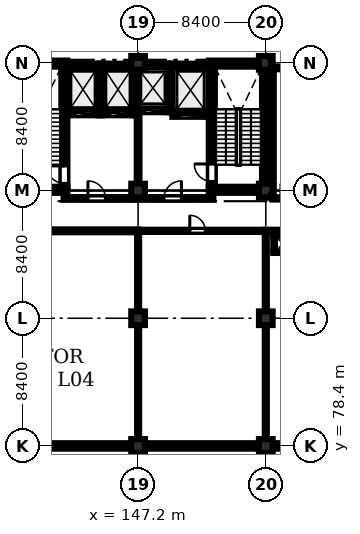
"""IFC4 building model, lengths in metres.
Left out: names, types, materials, properties, quantities, classifications, styles, units other than length and angle.
Written with IfcOpenShell. Run it as: python <this file> out.ifc"""

import sys

from ifc_helpers import new_model, si_unit, direction, frame, frame_2d, origin, origin_2d, place, context, subcontext, project, spatial, rectangle, extrude, element, fill, save


model = new_model("IFC4")
c1 = context("Model", 3, precision=1e-05, world=origin(), true_north=direction((0.0, 1.0)))
c2 = subcontext(c1, "Body", "Model", "MODEL_VIEW")
j1 = project(units=[si_unit("LENGTHUNIT", "METRE"), si_unit("PLANEANGLEUNIT", "RADIAN")], contexts=[c1])
p1 = place(None, origin())
s1 = spatial("IfcSite", under=j1, at=p1, CompositionType="ELEMENT")
p2 = place(p1, origin())
s2 = spatial("IfcBuilding", under=s1, at=p2, CompositionType="ELEMENT")
p3 = place(p2, frame((0.0, 0.0, 14.7)))
s3 = spatial("IfcBuildingStorey", under=s2, at=p3, CompositionType="ELEMENT", Elevation=14.7)
for number, where, z_axis, x_axis in (
    (1, (147.2, 78.4, 0.0), (0.0, 0.0, 1.0), (1.0, 0.0, 0.0)),
    (2, (147.2, 86.8, 0.0), (0.0, 0.0, 1.0), (1.0, 0.0, 0.0)),
    (3, (147.2, 95.2, 0.0), (0.0, 0.0, 1.0), (1.0, 0.0, 0.0)),
    (4, (147.2, 103.6, 0.0), (0.0, 0.0, 1.0), (1.0, 0.0, 0.0)),
    (5, (155.6, 78.4, 0.0), (0.0, 0.0, 1.0), (1.0, 0.0, 0.0)),
    (6, (155.6, 86.8, 0.0), (0.0, 0.0, 1.0), (1.0, 0.0, 0.0)),
    (7, (155.6, 95.2, 0.0), (0.0, 0.0, 1.0), (1.0, 0.0, 0.0)),
    (8, (155.6, 103.6, 0.0), (0.0, 0.0, 1.0), (1.0, 0.0, 0.0)),
):
    element("IfcColumn", number, at=place(p3, frame(where, z_axis=z_axis, x_axis=x_axis)), inside=s3, PredefinedType="COLUMN", context=c2, shape_type="SweptSolid", body=[
        extrude(rectangle(XDim=0.9, YDim=0.9, at=origin_2d()), origin(), (0.0, 0.0, 1.0), 4.26),
    ])
for number, where, z_axis, x_axis in (
    (9, (138.65, 95.25, 0.0), (0.0, 0.0, 1.0), (1.0, 0.0, 0.0)),
    (10, (138.65, 103.55, 0.0), (0.0, 0.0, 1.0), (1.0, 0.0, 0.0)),
):
    element("IfcWall", number, at=place(p3, frame(where, z_axis=z_axis, x_axis=x_axis)), inside=s3, PredefinedType="SHEAR", context=c2, shape_type="SweptSolid", body=[
        extrude(rectangle(XDim=3.9, YDim=0.4, at=frame_2d((1.95, 0.0))), origin(), (0.0, 0.0, 1.0), 4.26),
    ])
p4 = place(p3, frame((142.35, 95.45, 0.0), z_axis=(0.0, 0.0, 1.0), x_axis=(0.0, 1.0, 0.0)))
e11 = element("IfcWall", 11, at=p4, inside=s3, PredefinedType="SHEAR", context=c2, shape_type="SweptSolid", body=[
    extrude(rectangle(XDim=7.9, YDim=0.4, at=frame_2d((3.95, 0.0))), origin(), (0.0, 0.0, 1.0), 4.26),
])
p5 = place(p4, frame((0.22, 0.0, 0.0)))
e12 = element("IfcOpeningElement", 12, at=p5, cuts=e11, PredefinedType="OPENING", context=c2, shape_type="SweptSolid", body=[
    extrude(rectangle(XDim=1.15, YDim=2.15, at=frame_2d((0.575, 1.075))), frame((0.0, 0.21, 0.0), z_axis=(0.0, -1.0, 0.0), x_axis=(1.0, 0.0, 0.0)), (0.0, 0.0, 1.0), 0.42),
])
for number, where, z_axis, x_axis in (
    (13, (151.85, 95.25, 0.0), (0.0, 0.0, 1.0), (1.0, 0.0, 0.0)),
    (14, (151.85, 103.55, 0.0), (0.0, 0.0, 1.0), (1.0, 0.0, 0.0)),
):
    element("IfcWall", number, at=place(p3, frame(where, z_axis=z_axis, x_axis=x_axis)), inside=s3, PredefinedType="SHEAR", context=c2, shape_type="SweptSolid", body=[
        extrude(rectangle(XDim=3.9, YDim=0.4, at=frame_2d((1.95, 0.0))), origin(), (0.0, 0.0, 1.0), 4.26),
    ])
p6 = place(p3, frame((152.05, 95.45, 0.0), z_axis=(0.0, 0.0, 1.0), x_axis=(0.0, 1.0, 0.0)))
e15 = element("IfcWall", 15, at=p6, inside=s3, PredefinedType="SHEAR", context=c2, shape_type="SweptSolid", body=[
    extrude(rectangle(XDim=7.9, YDim=0.4, at=frame_2d((3.95, 0.0))), origin(), (0.0, 0.0, 1.0), 4.26),
])
p7 = place(p6, frame((0.35, 0.0, 0.0)))
e16 = element("IfcOpeningElement", 16, at=p7, cuts=e15, PredefinedType="OPENING", context=c2, shape_type="SweptSolid", body=[
    extrude(rectangle(XDim=1.15, YDim=2.15, at=frame_2d((0.575, 1.075))), frame((0.0, 0.21, 0.0), z_axis=(0.0, -1.0, 0.0), x_axis=(1.0, 0.0, 0.0)), (0.0, 0.0, 1.0), 0.42),
])
p8 = place(p3, frame((155.55, 95.45, 0.0), z_axis=(0.0, 0.0, 1.0), x_axis=(0.0, 1.0, 0.0)))
e17 = element("IfcWall", 17, at=p8, inside=s3, PredefinedType="SHEAR", context=c2, shape_type="SweptSolid", body=[
    extrude(rectangle(XDim=7.9, YDim=0.4, at=frame_2d((3.95, 0.0))), origin(), (0.0, 0.0, 1.0), 4.26),
])
p9 = place(p3, frame((142.55, 100.275, 0.0), z_axis=(0.0, 0.0, 1.0), x_axis=(1.0, 0.0, 0.0)))
e18 = element("IfcWall", 18, at=p9, inside=s3, PredefinedType="SHEAR", context=c2, shape_type="SweptSolid", body=[
    extrude(rectangle(XDim=2.05, YDim=0.25, at=frame_2d((1.025, 0.0))), origin(), (0.0, 0.0, 1.0), 4.26),
])
p10 = place(p9, frame((0.475, 0.0, 0.0)))
e19 = element("IfcOpeningElement", 19, at=p10, cuts=e18, PredefinedType="OPENING", context=c2, shape_type="SweptSolid", body=[
    extrude(rectangle(XDim=1.1, YDim=2.15, at=frame_2d((0.55, 1.075))), frame((0.0, 0.135, 0.0), z_axis=(0.0, -1.0, 0.0), x_axis=(1.0, 0.0, 0.0)), (0.0, 0.0, 1.0), 0.27),
])
p11 = place(p3, frame((142.55, 103.425, 0.0), z_axis=(0.0, 0.0, 1.0), x_axis=(1.0, 0.0, 0.0)))
e20 = element("IfcWall", 20, at=p11, inside=s3, PredefinedType="SHEAR", context=c2, shape_type="SweptSolid", body=[
    extrude(rectangle(XDim=2.05, YDim=0.25, at=frame_2d((1.025, 0.0))), origin(), (0.0, 0.0, 1.0), 4.26),
])
p12 = place(p3, frame((144.725, 100.15, 0.0), z_axis=(0.0, 0.0, 1.0), x_axis=(0.0, 1.0, 0.0)))
e21 = element("IfcWall", 21, at=p12, inside=s3, PredefinedType="SHEAR", context=c2, shape_type="SweptSolid", body=[
    extrude(rectangle(XDim=3.4, YDim=0.25, at=frame_2d((1.7, 0.0))), origin(), (0.0, 0.0, 1.0), 4.26),
])
p13 = place(p3, frame((144.85, 100.275, 0.0), z_axis=(0.0, 0.0, 1.0), x_axis=(1.0, 0.0, 0.0)))
e22 = element("IfcWall", 22, at=p13, inside=s3, PredefinedType="SHEAR", context=c2, shape_type="SweptSolid", body=[
    extrude(rectangle(XDim=2.05, YDim=0.25, at=frame_2d((1.025, 0.0))), origin(), (0.0, 0.0, 1.0), 4.26),
])
p14 = place(p13, frame((0.465, 0.0, 0.0)))
e23 = element("IfcOpeningElement", 23, at=p14, cuts=e22, PredefinedType="OPENING", context=c2, shape_type="SweptSolid", body=[
    extrude(rectangle(XDim=1.12, YDim=2.15, at=frame_2d((0.56, 1.075))), frame((0.0, 0.135, 0.0), z_axis=(0.0, -1.0, 0.0), x_axis=(1.0, 0.0, 0.0)), (0.0, 0.0, 1.0), 0.27),
])
p15 = place(p3, frame((144.85, 103.425, 0.0), z_axis=(0.0, 0.0, 1.0), x_axis=(1.0, 0.0, 0.0)))
e24 = element("IfcWall", 24, at=p15, inside=s3, PredefinedType="SHEAR", context=c2, shape_type="SweptSolid", body=[
    extrude(rectangle(XDim=2.05, YDim=0.25, at=frame_2d((1.025, 0.0))), origin(), (0.0, 0.0, 1.0), 4.26),
])
p16 = place(p3, frame((147.025, 100.15, 0.0), z_axis=(0.0, 0.0, 1.0), x_axis=(0.0, 1.0, 0.0)))
e25 = element("IfcWall", 25, at=p16, inside=s3, PredefinedType="SHEAR", context=c2, shape_type="SweptSolid", body=[
    extrude(rectangle(XDim=3.4, YDim=0.25, at=frame_2d((1.7, 0.0))), origin(), (0.0, 0.0, 1.0), 4.26),
])
p17 = place(p3, frame((147.15, 100.475, 0.0), z_axis=(0.0, 0.0, 1.0), x_axis=(1.0, 0.0, 0.0)))
e26 = element("IfcWall", 26, at=p17, inside=s3, PredefinedType="SHEAR", context=c2, shape_type="SweptSolid", body=[
    extrude(rectangle(XDim=2.05, YDim=0.25, at=frame_2d((1.025, 0.0))), origin(), (0.0, 0.0, 1.0), 4.26),
])
p18 = place(p17, frame((0.495, 0.0, 0.0)))
e27 = element("IfcOpeningElement", 27, at=p18, cuts=e26, PredefinedType="OPENING", context=c2, shape_type="SweptSolid", body=[
    extrude(rectangle(XDim=1.06, YDim=2.15, at=frame_2d((0.53, 1.075))), frame((0.0, 0.135, 0.0), z_axis=(0.0, -1.0, 0.0), x_axis=(1.0, 0.0, 0.0)), (0.0, 0.0, 1.0), 0.27),
])
p19 = place(p3, frame((147.15, 103.425, 0.0), z_axis=(0.0, 0.0, 1.0), x_axis=(1.0, 0.0, 0.0)))
e28 = element("IfcWall", 28, at=p19, inside=s3, PredefinedType="SHEAR", context=c2, shape_type="SweptSolid", body=[
    extrude(rectangle(XDim=2.05, YDim=0.25, at=frame_2d((1.025, 0.0))), origin(), (0.0, 0.0, 1.0), 4.26),
])
p20 = place(p3, frame((149.325, 100.35, 0.0), z_axis=(0.0, 0.0, 1.0), x_axis=(0.0, 1.0, 0.0)))
e29 = element("IfcWall", 29, at=p20, inside=s3, PredefinedType="SHEAR", context=c2, shape_type="SweptSolid", body=[
    extrude(rectangle(XDim=3.2, YDim=0.25, at=frame_2d((1.6, 0.0))), origin(), (0.0, 0.0, 1.0), 4.26),
])
p21 = place(p3, frame((149.45, 100.175, 0.0), z_axis=(0.0, 0.0, 1.0), x_axis=(1.0, 0.0, 0.0)))
e30 = element("IfcWall", 30, at=p21, inside=s3, PredefinedType="SHEAR", context=c2, shape_type="SweptSolid", body=[
    extrude(rectangle(XDim=2.4, YDim=0.25, at=frame_2d((1.2, 0.0))), origin(), (0.0, 0.0, 1.0), 4.26),
])
p22 = place(p21, frame((0.55, 0.0, 0.0)))
e31 = element("IfcOpeningElement", 31, at=p22, cuts=e30, PredefinedType="OPENING", context=c2, shape_type="SweptSolid", body=[
    extrude(rectangle(XDim=1.3, YDim=2.25, at=frame_2d((0.65, 1.125))), frame((0.0, 0.135, 0.0), z_axis=(0.0, -1.0, 0.0), x_axis=(1.0, 0.0, 0.0)), (0.0, 0.0, 1.0), 0.27),
])
p23 = place(p3, frame((149.45, 103.425, 0.0), z_axis=(0.0, 0.0, 1.0), x_axis=(1.0, 0.0, 0.0)))
e32 = element("IfcWall", 32, at=p23, inside=s3, PredefinedType="SHEAR", context=c2, shape_type="SweptSolid", body=[
    extrude(rectangle(XDim=2.4, YDim=0.25, at=frame_2d((1.2, 0.0))), origin(), (0.0, 0.0, 1.0), 4.26),
])
p24 = place(p3, frame((146.75, 78.4, 0.0), z_axis=(0.0, 0.0, 1.0), x_axis=(-1.0, 0.0, 0.0)))
e33 = element("IfcWall", 33, at=p24, inside=s3, PredefinedType="STANDARD", context=c2, shape_type="SweptSolid", body=[
    extrude(rectangle(XDim=7.5, YDim=0.36, at=frame_2d((3.75, 0.0))), origin(), (0.0, 0.0, 1.0), 3.56),
])
p25 = place(p24, frame((1.15, 0.0, 0.95)))
e34 = element("IfcOpeningElement", 34, at=p25, cuts=e33, PredefinedType="OPENING", context=c2, shape_type="SweptSolid", body=[
    extrude(rectangle(XDim=1.5, YDim=1.5, at=frame_2d((0.75, 0.75))), frame((0.0, 0.19, 0.0), z_axis=(0.0, -1.0, 0.0), x_axis=(1.0, 0.0, 0.0)), (0.0, 0.0, 1.0), 0.38),
])
p26 = place(p3, frame((155.15, 78.4, 0.0), z_axis=(0.0, 0.0, 1.0), x_axis=(-1.0, 0.0, 0.0)))
e35 = element("IfcWall", 35, at=p26, inside=s3, PredefinedType="STANDARD", context=c2, shape_type="SweptSolid", body=[
    extrude(rectangle(XDim=7.5, YDim=0.36, at=frame_2d((3.75, 0.0))), origin(), (0.0, 0.0, 1.0), 3.56),
])
p27 = place(p26, frame((1.15, 0.0, 0.95)))
e36 = element("IfcOpeningElement", 36, at=p27, cuts=e35, PredefinedType="OPENING", context=c2, shape_type="SweptSolid", body=[
    extrude(rectangle(XDim=1.5, YDim=1.5, at=frame_2d((0.75, 0.75))), frame((0.0, 0.19, 0.0), z_axis=(0.0, -1.0, 0.0), x_axis=(1.0, 0.0, 0.0)), (0.0, 0.0, 1.0), 0.38),
])
p28 = place(p3, frame((163.0, 78.4, 0.0), z_axis=(0.0, 0.0, 1.0), x_axis=(-1.0, 0.0, 0.0)))
e37 = element("IfcWall", 37, at=p28, inside=s3, PredefinedType="STANDARD", context=c2, shape_type="SweptSolid", body=[
    extrude(rectangle(XDim=6.95, YDim=0.36, at=frame_2d((3.475, 0.0))), origin(), (0.0, 0.0, 1.0), 3.56),
])
p29 = place(p28, frame((1.15, 0.0, 0.95)))
e38 = element("IfcOpeningElement", 38, at=p29, cuts=e37, PredefinedType="OPENING", context=c2, shape_type="SweptSolid", body=[
    extrude(rectangle(XDim=1.5, YDim=1.5, at=frame_2d((0.75, 0.75))), frame((0.0, 0.19, 0.0), z_axis=(0.0, -1.0, 0.0), x_axis=(1.0, 0.0, 0.0)), (0.0, 0.0, 1.0), 0.38),
])
p30 = place(p3, frame((142.3, 94.68, 0.0), z_axis=(0.0, 0.0, 1.0), x_axis=(1.0, 0.0, 0.0)))
e39 = element("IfcWall", 39, at=p30, inside=s3, PredefinedType="STANDARD", context=c2, shape_type="SweptSolid", body=[
    extrude(rectangle(XDim=4.8, YDim=0.18, at=frame_2d((2.4, 0.0))), origin(), (0.0, 0.0, 1.0), 4.26),
])
p31 = place(p30, frame((1.6, 0.0, 0.0)))
e40 = element("IfcOpeningElement", 40, at=p31, cuts=e39, PredefinedType="OPENING", context=c2, shape_type="SweptSolid", body=[
    extrude(rectangle(XDim=1.15, YDim=2.15, at=frame_2d((0.575, 1.075))), frame((0.0, 0.1, 0.0), z_axis=(0.0, -1.0, 0.0), x_axis=(1.0, 0.0, 0.0)), (0.0, 0.0, 1.0), 0.2),
])
p32 = place(p3, frame((147.3, 94.68, 0.0), z_axis=(0.0, 0.0, 1.0), x_axis=(1.0, 0.0, 0.0)))
e41 = element("IfcWall", 41, at=p32, inside=s3, PredefinedType="STANDARD", context=c2, shape_type="SweptSolid", body=[
    extrude(rectangle(XDim=4.85, YDim=0.18, at=frame_2d((2.425, 0.0))), origin(), (0.0, 0.0, 1.0), 4.26),
])
p33 = place(p32, frame((1.6, 0.0, 0.0)))
e42 = element("IfcOpeningElement", 42, at=p33, cuts=e41, PredefinedType="OPENING", context=c2, shape_type="SweptSolid", body=[
    extrude(rectangle(XDim=1.15, YDim=2.15, at=frame_2d((0.575, 1.075))), frame((0.0, 0.1, 0.0), z_axis=(0.0, -1.0, 0.0), x_axis=(1.0, 0.0, 0.0)), (0.0, 0.0, 1.0), 0.2),
])
p34 = place(p3, frame((147.2, 95.75, 0.0), z_axis=(0.0, 0.0, 1.0), x_axis=(0.0, 1.0, 0.0)))
e43 = element("IfcWall", 43, at=p34, inside=s3, PredefinedType="STANDARD", context=c2, shape_type="SweptSolid", body=[
    extrude(rectangle(XDim=4.5, YDim=0.18, at=frame_2d((2.25, 0.0))), origin(), (0.0, 0.0, 1.0), 3.51),
])
p35 = place(p3, frame((156.05, 94.68, 0.0), z_axis=(0.0, 0.0, 1.0), x_axis=(1.0, 0.0, 0.0)))
e44 = element("IfcWall", 44, at=p35, inside=s3, PredefinedType="PARTITIONING", context=c2, shape_type="SweptSolid", body=[
    extrude(rectangle(XDim=7.15, YDim=0.15, at=frame_2d((3.575, 0.0))), origin(), (0.0, 0.0, 1.0), 4.26),
])
p36 = place(p35, frame((0.55, 0.0, 0.0)))
e45 = element("IfcOpeningElement", 45, at=p36, cuts=e44, PredefinedType="OPENING", context=c2, shape_type="SweptSolid", body=[
    extrude(rectangle(XDim=0.98, YDim=2.12, at=frame_2d((0.49, 1.06))), frame((0.0, 0.085, 0.0), z_axis=(0.0, -1.0, 0.0), x_axis=(1.0, 0.0, 0.0)), (0.0, 0.0, 1.0), 0.17),
])
p37 = place(p3, frame((156.05, 103.25, 0.0), z_axis=(0.0, 0.0, 1.0), x_axis=(1.0, 0.0, 0.0)))
e46 = element("IfcWall", 46, at=p37, inside=s3, PredefinedType="PARTITIONING", context=c2, shape_type="SweptSolid", body=[
    extrude(rectangle(XDim=7.15, YDim=0.15, at=frame_2d((3.575, 0.0))), origin(), (0.0, 0.0, 1.0), 4.26),
])
p38 = place(p3, frame((156.05, 94.68, 0.0), z_axis=(0.0, 0.0, 1.0), x_axis=(0.0, 1.0, 0.0)))
e47 = element("IfcWall", 47, at=p38, inside=s3, PredefinedType="PARTITIONING", context=c2, shape_type="SweptSolid", body=[
    extrude(rectangle(XDim=8.57, YDim=0.15, at=frame_2d((4.285, 0.0))), origin(), (0.0, 0.0, 1.0), 4.26),
])
p39 = place(p3, frame((122.15, 92.55, 0.0), z_axis=(0.0, 0.0, 1.0), x_axis=(1.0, 0.0, 0.0)))
e48 = element("IfcWall", 48, at=p39, inside=s3, PredefinedType="SOLIDWALL", context=c2, shape_type="SweptSolid", body=[
    extrude(rectangle(XDim=25.05, YDim=0.19, at=frame_2d((12.525, 0.0))), origin(), (0.0, 0.0, 1.0), 4.26),
])
p40 = place(p39, frame((3.75, 0.0, 0.0)))
e49 = element("IfcOpeningElement", 49, at=p40, cuts=e48, PredefinedType="OPENING", context=c2, shape_type="SweptSolid", body=[
    extrude(rectangle(XDim=1.38, YDim=2.22, at=frame_2d((0.69, 1.11))), frame((0.0, 0.105, 0.0), z_axis=(0.0, -1.0, 0.0), x_axis=(1.0, 0.0, 0.0)), (0.0, 0.0, 1.0), 0.21),
])
p41 = place(p3, frame((147.2, 92.55, 0.0), z_axis=(0.0, 0.0, 1.0), x_axis=(1.0, 0.0, 0.0)))
e50 = element("IfcWall", 50, at=p41, inside=s3, PredefinedType="PARTITIONING", context=c2, shape_type="SweptSolid", body=[
    extrude(rectangle(XDim=8.4, YDim=0.145, at=frame_2d((4.2, 0.0))), origin(), (0.0, 0.0, 1.0), 4.26),
])
p42 = place(p41, frame((3.4, 0.0, 0.0)))
e51 = element("IfcOpeningElement", 51, at=p42, cuts=e50, PredefinedType="OPENING", context=c2, shape_type="SweptSolid", body=[
    extrude(rectangle(XDim=1.02, YDim=2.15, at=frame_2d((0.51, 1.075))), frame((0.0, 0.083, 0.0), z_axis=(0.0, -1.0, 0.0), x_axis=(1.0, 0.0, 0.0)), (0.0, 0.0, 1.0), 0.165),
])
p43 = place(p3, frame((147.2, 78.55, 0.0), z_axis=(0.0, 0.0, 1.0), x_axis=(0.0, 1.0, 0.0)))
e52 = element("IfcWall", 52, at=p43, inside=s3, PredefinedType="PARTITIONING", context=c2, shape_type="SweptSolid", body=[
    extrude(rectangle(XDim=14.0, YDim=0.135, at=frame_2d((7.0, 0.0))), origin(), (0.0, 0.0, 1.0), 3.51),
])
p44 = place(p3, frame((155.6, 92.55, 0.0), z_axis=(0.0, 0.0, 1.0), x_axis=(1.0, 0.0, 0.0)))
e53 = element("IfcWall", 53, at=p44, inside=s3, PredefinedType="PARTITIONING", context=c2, shape_type="SweptSolid", body=[
    extrude(rectangle(XDim=7.75, YDim=0.145, at=frame_2d((3.875, 0.0))), origin(), (0.0, 0.0, 1.0), 4.26),
])
p45 = place(p44, frame((3.4, 0.0, 0.0)))
e54 = element("IfcOpeningElement", 54, at=p45, cuts=e53, PredefinedType="OPENING", context=c2, shape_type="SweptSolid", body=[
    extrude(rectangle(XDim=1.02, YDim=2.15, at=frame_2d((0.51, 1.075))), frame((0.0, 0.083, 0.0), z_axis=(0.0, -1.0, 0.0), x_axis=(1.0, 0.0, 0.0)), (0.0, 0.0, 1.0), 0.165),
])
p46 = place(p3, frame((155.6, 78.55, 0.0), z_axis=(0.0, 0.0, 1.0), x_axis=(0.0, 1.0, 0.0)))
e55 = element("IfcWall", 55, at=p46, inside=s3, PredefinedType="PARTITIONING", context=c2, shape_type="SweptSolid", body=[
    extrude(rectangle(XDim=14.0, YDim=0.135, at=frame_2d((7.0, 0.0))), origin(), (0.0, 0.0, 1.0), 3.51),
])
for number, where, z_axis, x_axis in (
    (56, (156.095, 91.147, 0.0), (0.0, 0.0, 1.0), (1.0, 0.0, 0.0)),
    (57, (156.095, 92.252, 0.0), (0.0, 0.0, 1.0), (1.0, 0.0, 0.0)),
):
    element("IfcWall", number, at=place(p3, frame(where, z_axis=z_axis, x_axis=x_axis)), inside=s3, PredefinedType="PARTITIONING", context=c2, shape_type="SweptSolid", body=[
        extrude(rectangle(XDim=1.31, YDim=0.105, at=frame_2d((0.655, 0.0))), origin(), (0.0, 0.0, 1.0), 4.26),
    ])
p47 = place(p3, frame((156.147, 91.2, 0.0), z_axis=(0.0, 0.0, 1.0), x_axis=(0.0, 1.0, 0.0)))
e58 = element("IfcWall", 58, at=p47, inside=s3, PredefinedType="PARTITIONING", context=c2, shape_type="SweptSolid", body=[
    extrude(rectangle(XDim=1.0, YDim=0.105, at=frame_2d((0.5, 0.0))), origin(), (0.0, 0.0, 1.0), 4.26),
])
p48 = place(p25, origin())
e59 = element("IfcWindow", 59, at=p48, inside=s3, PartitioningType="DOUBLE_PANEL_VERTICAL", PredefinedType="WINDOW", context=c2, shape_type="SweptSolid", body=[
    extrude(rectangle(XDim=1.5, YDim=1.5, at=frame_2d((0.75, 0.75))), frame((0.0, 0.03, 0.0), z_axis=(0.0, -1.0, 0.0), x_axis=(1.0, 0.0, 0.0)), (0.0, 0.0, 1.0), 0.06),
])
fill(e34, e59)
p49 = place(p27, origin())
e60 = element("IfcWindow", 60, at=p49, inside=s3, PartitioningType="DOUBLE_PANEL_VERTICAL", PredefinedType="WINDOW", context=c2, shape_type="SweptSolid", body=[
    extrude(rectangle(XDim=1.5, YDim=1.5, at=frame_2d((0.75, 0.75))), frame((0.0, 0.03, 0.0), z_axis=(0.0, -1.0, 0.0), x_axis=(1.0, 0.0, 0.0)), (0.0, 0.0, 1.0), 0.06),
])
fill(e36, e60)
p50 = place(p31, origin())
e61 = element("IfcDoor", 61, at=p50, inside=s3, OperationType="SINGLE_SWING_LEFT", PredefinedType="DOOR", context=c2, shape_type="SweptSolid", body=[
    extrude(rectangle(XDim=1.15, YDim=2.15, at=frame_2d((0.575, 1.075))), frame((0.0, 0.025, 0.0), z_axis=(0.0, -1.0, 0.0), x_axis=(1.0, 0.0, 0.0)), (0.0, 0.0, 1.0), 0.05),
])
fill(e40, e61)
p51 = place(p33, origin())
e62 = element("IfcDoor", 62, at=p51, inside=s3, OperationType="SINGLE_SWING_RIGHT", PredefinedType="DOOR", context=c2, shape_type="SweptSolid", body=[
    extrude(rectangle(XDim=1.15, YDim=2.15, at=frame_2d((0.575, 1.075))), frame((0.0, 0.025, 0.0), z_axis=(0.0, -1.0, 0.0), x_axis=(1.0, 0.0, 0.0)), (0.0, 0.0, 1.0), 0.05),
])
fill(e42, e62)
p52 = place(p42, origin())
e63 = element("IfcDoor", 63, at=p52, inside=s3, OperationType="SINGLE_SWING_LEFT", PredefinedType="DOOR", context=c2, shape_type="SweptSolid", body=[
    extrude(rectangle(XDim=1.02, YDim=2.15, at=frame_2d((0.51, 1.075))), frame((0.0, 0.025, 0.0), z_axis=(0.0, -1.0, 0.0), x_axis=(1.0, 0.0, 0.0)), (0.0, 0.0, 1.0), 0.05),
])
fill(e51, e63)
p53 = place(p5, origin())
e64 = element("IfcDoor", 64, at=p53, inside=s3, OperationType="SINGLE_SWING_RIGHT", PredefinedType="DOOR", context=c2, shape_type="SweptSolid", body=[
    extrude(rectangle(XDim=1.15, YDim=2.15, at=frame_2d((0.575, 1.075))), frame((0.0, 0.025, 0.0), z_axis=(0.0, -1.0, 0.0), x_axis=(1.0, 0.0, 0.0)), (0.0, 0.0, 1.0), 0.05),
])
fill(e12, e64)
p54 = place(p7, origin())
e65 = element("IfcDoor", 65, at=p54, inside=s3, OperationType="SINGLE_SWING_RIGHT", PredefinedType="DOOR", context=c2, shape_type="SweptSolid", body=[
    extrude(rectangle(XDim=1.15, YDim=2.15, at=frame_2d((0.575, 1.075))), frame((0.0, 0.025, 0.0), z_axis=(0.0, -1.0, 0.0), x_axis=(1.0, 0.0, 0.0)), (0.0, 0.0, 1.0), 0.05),
])
fill(e16, e65)
p55 = place(p10, origin())
e66 = element("IfcDoor", 66, at=p55, inside=s3, OperationType="SLIDING_TO_LEFT", PredefinedType="DOOR", context=c2, shape_type="SweptSolid", body=[
    extrude(rectangle(XDim=1.1, YDim=2.15, at=frame_2d((0.55, 1.075))), frame((0.0, 0.025, 0.0), z_axis=(0.0, -1.0, 0.0), x_axis=(1.0, 0.0, 0.0)), (0.0, 0.0, 1.0), 0.05),
])
fill(e19, e66)
p56 = place(p14, origin())
e67 = element("IfcDoor", 67, at=p56, inside=s3, OperationType="SLIDING_TO_LEFT", PredefinedType="DOOR", context=c2, shape_type="SweptSolid", body=[
    extrude(rectangle(XDim=1.12, YDim=2.15, at=frame_2d((0.56, 1.075))), frame((0.0, 0.025, 0.0), z_axis=(0.0, -1.0, 0.0), x_axis=(1.0, 0.0, 0.0)), (0.0, 0.0, 1.0), 0.05),
])
fill(e23, e67)
p57 = place(p18, origin())
e68 = element("IfcDoor", 68, at=p57, inside=s3, OperationType="SLIDING_TO_LEFT", PredefinedType="DOOR", context=c2, shape_type="SweptSolid", body=[
    extrude(rectangle(XDim=1.06, YDim=2.15, at=frame_2d((0.53, 1.075))), frame((0.0, 0.025, 0.0), z_axis=(0.0, -1.0, 0.0), x_axis=(1.0, 0.0, 0.0)), (0.0, 0.0, 1.0), 0.05),
])
fill(e27, e68)
p58 = place(p22, origin())
e69 = element("IfcDoor", 69, at=p58, inside=s3, OperationType="SLIDING_TO_LEFT", PredefinedType="DOOR", context=c2, shape_type="SweptSolid", body=[
    extrude(rectangle(XDim=1.3, YDim=2.25, at=frame_2d((0.65, 1.125))), frame((0.0, 0.025, 0.0), z_axis=(0.0, -1.0, 0.0), x_axis=(1.0, 0.0, 0.0)), (0.0, 0.0, 1.0), 0.05),
])
fill(e31, e69)
save(model, sys.argv[1])
